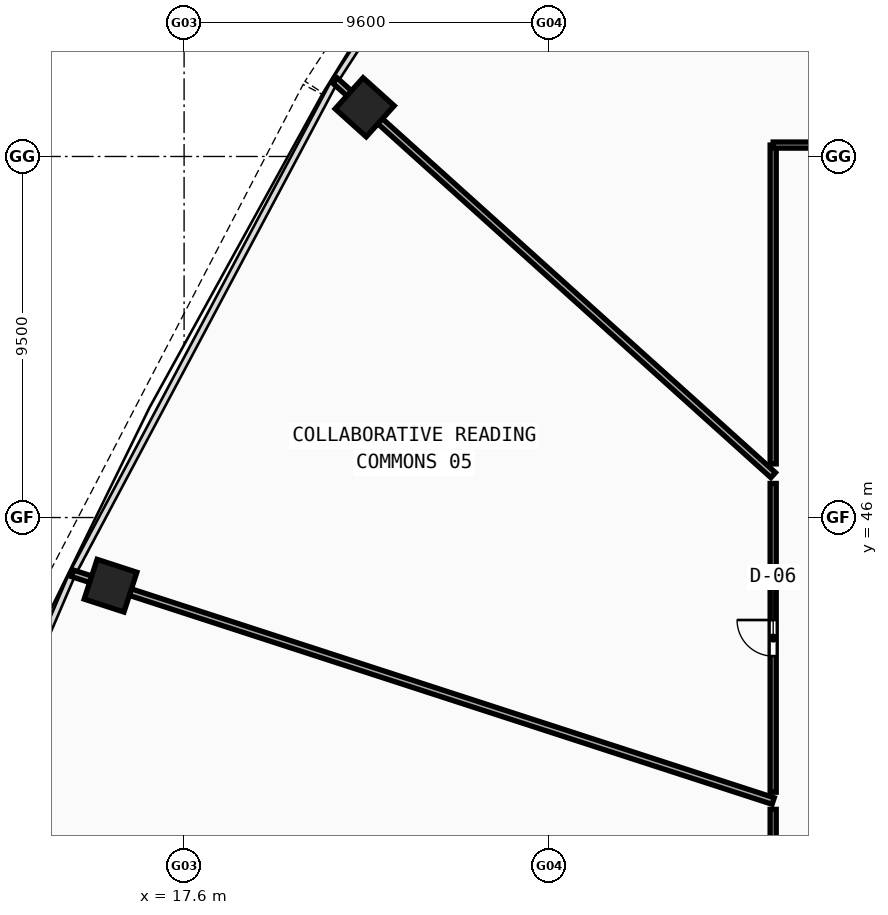
"""IFC4 building model, lengths in metres.
Left out: names, types, materials, properties, quantities, classifications, styles, units other than length and angle.
Written with IfcOpenShell. Run it as: python <this file> out.ifc"""

import sys

from ifc_helpers import new_model, si_unit, direction, frame, frame_2d, origin, origin_with_axes, origin_2d, place, context, subcontext, project, spatial, rectangle, hollow_rectangle, extrude, source, transform, mapped, element, fill, save


model = new_model("IFC4")
c1 = context("Model", 3, precision=1e-05, world=origin(), true_north=direction((0.0, 1.0)))
c2 = subcontext(c1, "Body", "Model", "MODEL_VIEW")
j1 = project(units=[si_unit("LENGTHUNIT", "METRE"), si_unit("PLANEANGLEUNIT", "RADIAN")], contexts=[c1])
p1 = place(None, origin())
s1 = spatial("IfcSite", under=j1, at=p1, CompositionType="ELEMENT")
p2 = place(p1, origin())
s2 = spatial("IfcBuilding", under=s1, at=p2, CompositionType="ELEMENT")
p3 = place(p2, frame((0.0, 0.0, 63.07)))
s3 = spatial("IfcBuildingStorey", under=s2, at=p3, CompositionType="ELEMENT", Elevation=63.07)
m1 = source(origin(), c2, "Body", "SweptSolid", [
    extrude(hollow_rectangle(XDim=1.1, YDim=1.1, WallThickness=0.045, at=origin_2d()), origin(), (0.0, 0.0, 1.0), 3.63),
])
for number, where, z_axis, x_axis in (
    (1, (22.351, 56.794, -0.26), (0.0, 0.0, 1.0), (-0.669, -0.743, 0.0)),
    (2, (15.665, 44.206, -0.26), (0.0, 0.0, 1.0), (-0.309, -0.951, 0.0)),
):
    element("IfcColumn", number, at=place(p3, frame(where, z_axis=z_axis, x_axis=x_axis)), inside=s3, PredefinedType="COLUMN", context=c2, shape_type="MappedRepresentation", body=[
        mapped(m1, transform((0.0, 0.0, 0.0), scale=1.0)),
    ])
p4 = place(p3, frame((33.1, 47.116, 0.0), z_axis=(0.0, 0.0, 1.0), x_axis=(-0.743143105339, 0.669132516761, 0.0)))
e3 = element("IfcWall", 3, at=p4, inside=s3, PredefinedType="PARTITIONING", context=c2, shape_type="SweptSolid", body=[
    extrude(rectangle(XDim=15.514, YDim=0.18, at=frame_2d((7.757, 0.0))), origin(), (0.0, 0.0, 1.0), 2.67),
])
p5 = place(p3, frame((33.1, 38.541, 0.0), z_axis=(0.0, 0.0, 1.0), x_axis=(-0.951054245528, 0.309023982992, 0.0)))
e4 = element("IfcWall", 4, at=p5, inside=s3, PredefinedType="PARTITIONING", context=c2, shape_type="SweptSolid", body=[
    extrude(rectangle(XDim=19.383, YDim=0.18, at=frame_2d((9.691, 0.0))), origin(), (0.0, 0.0, 1.0), 2.67),
])
p6 = place(p3, frame((33.1, 31.292, 0.0), z_axis=(0.0, 0.0, 1.0), x_axis=(0.0, 1.0, 0.0)))
e5 = element("IfcWall", 5, at=p6, inside=s3, PredefinedType="PARTITIONING", context=c2, shape_type="SweptSolid", body=[
    extrude(rectangle(XDim=7.029, YDim=0.16, at=frame_2d((3.515, 0.0))), origin(), (0.0, 0.0, 1.0), 3.37),
])
p7 = place(p6, frame((3.04, 0.0, 0.0)))
e6 = element("IfcOpeningElement", 6, at=p7, cuts=e5, PredefinedType="OPENING", context=c2, shape_type="SweptSolid", body=[
    extrude(rectangle(XDim=0.95, YDim=2.1, at=frame_2d((0.475, 1.05))), frame((0.0, 0.09, 0.0), z_axis=(0.0, -1.0, 0.0), x_axis=(1.0, 0.0, 0.0)), (0.0, 0.0, 1.0), 0.18),
])
p8 = place(p3, frame((33.1, 38.773, 0.0), z_axis=(0.0, 0.0, 1.0), x_axis=(0.0, 1.0, 0.0)))
e7 = element("IfcWall", 7, at=p8, inside=s3, PredefinedType="PARTITIONING", context=c2, shape_type="SweptSolid", body=[
    extrude(rectangle(XDim=8.124, YDim=0.16, at=frame_2d((4.062, 0.0))), origin(), (0.0, 0.0, 1.0), 2.67),
])
p9 = place(p8, frame((3.581, 0.0, 0.0)))
e8 = element("IfcOpeningElement", 8, at=p9, cuts=e7, PredefinedType="OPENING", context=c2, shape_type="SweptSolid", body=[
    extrude(rectangle(XDim=0.95, YDim=2.1, at=frame_2d((0.475, 1.05))), frame((0.0, 0.09, 0.0), z_axis=(0.0, -1.0, 0.0), x_axis=(1.0, 0.0, 0.0)), (0.0, 0.0, 1.0), 0.18),
])
p10 = place(p3, frame((33.1, 47.412, 0.0), z_axis=(0.0, 0.0, 1.0), x_axis=(0.0, 1.0, 0.0)))
e9 = element("IfcWall", 9, at=p10, inside=s3, PredefinedType="PARTITIONING", context=c2, shape_type="SweptSolid", body=[
    extrude(rectangle(XDim=8.388, YDim=0.16, at=frame_2d((4.194, 0.0))), origin(), (0.0, 0.0, 1.0), 3.37),
])
p11 = place(p3, frame((33.1, 55.8, 0.0), z_axis=(0.0, 0.0, 1.0), x_axis=(1.0, 0.0, 0.0)))
e10 = element("IfcWall", 10, at=p11, inside=s3, PredefinedType="PARTITIONING", context=c2, shape_type="SweptSolid", body=[
    extrude(rectangle(XDim=10.609, YDim=0.16, at=frame_2d((5.304, 0.0))), origin(), (0.0, 0.0, 1.0), 2.67),
])
p12 = place(p11, frame((4.635, 0.0, 0.0)))
e11 = element("IfcOpeningElement", 11, at=p12, cuts=e10, PredefinedType="OPENING", context=c2, shape_type="SweptSolid", body=[
    extrude(rectangle(XDim=0.95, YDim=2.1, at=frame_2d((0.475, 1.05))), frame((0.0, 0.09, 0.0), z_axis=(0.0, -1.0, 0.0), x_axis=(1.0, 0.0, 0.0)), (0.0, 0.0, 1.0), 0.18),
])
m2 = source(origin(), c2, "Body", "SweptSolid", [
    extrude(rectangle(XDim=0.95, YDim=2.1, at=frame_2d((0.475, 1.05))), frame((0.0, 0.025, 0.0), z_axis=(0.0, -1.0, 0.0), x_axis=(1.0, 0.0, 0.0)), (0.0, 0.0, 1.0), 0.05),
])
p13 = place(p9, origin_with_axes())
e12 = element("IfcDoor", 12, at=p13, inside=s3, OperationType="SINGLE_SWING_RIGHT", PredefinedType="DOOR", context=c2, shape_type="MappedRepresentation", body=[
    mapped(m2, transform((0.0, 0.0, 0.0), scale=1.0)),
])
fill(e8, e12)
save(model, sys.argv[1])
